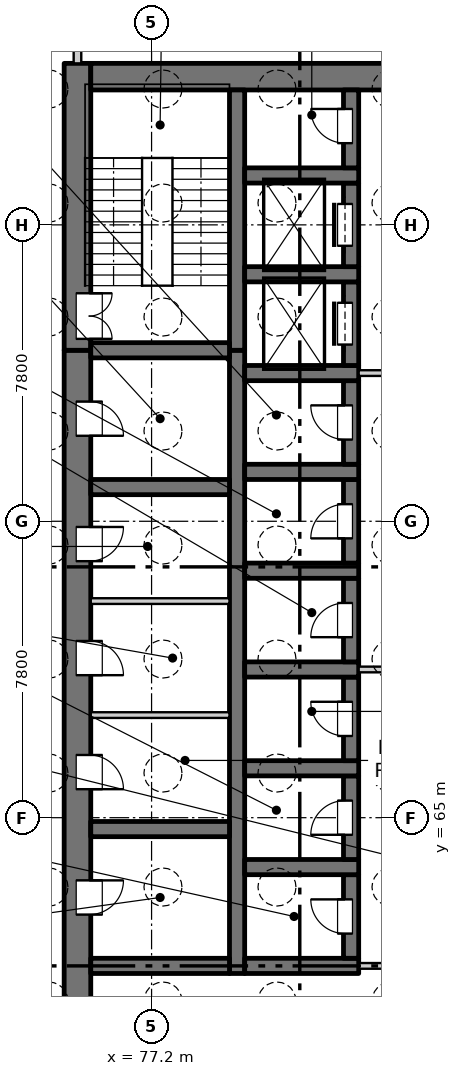
"""IFC4 building model, lengths in metres.
Left out: names, types, materials, properties, quantities, classifications, styles, units other than length and angle.
Written with IfcOpenShell. Run it as: python <this file> out.ifc"""

import sys

from ifc_helpers import new_model, si_unit, direction, frame, frame_2d, origin, place, context, subcontext, project, spatial, rectangle, extrude, element, fill, save


model = new_model("IFC4")
c1 = context("Model", 3, precision=1e-05, world=origin(), true_north=direction((0.0, 1.0)))
c2 = subcontext(c1, "Body", "Model", "MODEL_VIEW")
j1 = project(units=[si_unit("LENGTHUNIT", "METRE"), si_unit("PLANEANGLEUNIT", "RADIAN")], contexts=[c1])
p1 = place(None, origin())
s1 = spatial("IfcSite", under=j1, at=p1, CompositionType="ELEMENT")
p2 = place(p1, origin())
s2 = spatial("IfcBuilding", under=s1, at=p2, CompositionType="ELEMENT")
p3 = place(p2, frame((0.0, 0.0, -9.0)))
s3 = spatial("IfcBuildingStorey", under=s2, at=p3, CompositionType="ELEMENT", Elevation=-9.0)
p4 = place(p3, frame((75.25, 54.9, -0.5), z_axis=(0.0, 0.0, 1.0), x_axis=(0.0, 1.0, 0.0)))
e1 = element("IfcWall", 1, at=p4, inside=s3, PredefinedType="SOLIDWALL", context=c2, shape_type="SweptSolid", body=[
    extrude(rectangle(XDim=22.4, YDim=0.7, at=frame_2d((11.2, 0.0))), origin(), (0.0, 0.0, 1.0), 4.65),
])
p5 = place(p4, frame((7.55, 0.0, 0.5)))
e2 = element("IfcOpeningElement", 2, at=p5, cuts=e1, PredefinedType="OPENING", context=c2, shape_type="SweptSolid", body=[
    extrude(rectangle(XDim=0.9, YDim=2.1, at=frame_2d((0.45, 1.05))), frame((0.0, 0.36, 0.0), z_axis=(0.0, -1.0, 0.0), x_axis=(1.0, 0.0, 0.0)), (0.0, 0.0, 1.0), 0.72),
])
p6 = place(p4, frame((10.85, 0.0, 0.5)))
e3 = element("IfcOpeningElement", 3, at=p6, cuts=e1, PredefinedType="OPENING", context=c2, shape_type="SweptSolid", body=[
    extrude(rectangle(XDim=0.9, YDim=2.1, at=frame_2d((0.45, 1.05))), frame((0.0, 0.36, 0.0), z_axis=(0.0, -1.0, 0.0), x_axis=(1.0, 0.0, 0.0)), (0.0, 0.0, 1.0), 0.72),
])
p7 = place(p4, frame((13.85, 0.0, 0.5)))
e4 = element("IfcOpeningElement", 4, at=p7, cuts=e1, PredefinedType="OPENING", context=c2, shape_type="SweptSolid", body=[
    extrude(rectangle(XDim=0.9, YDim=2.1, at=frame_2d((0.45, 1.05))), frame((0.0, 0.36, 0.0), z_axis=(0.0, -1.0, 0.0), x_axis=(1.0, 0.0, 0.0)), (0.0, 0.0, 1.0), 0.72),
])
p8 = place(p4, frame((16.85, 0.0, 0.5)))
e5 = element("IfcOpeningElement", 5, at=p8, cuts=e1, PredefinedType="OPENING", context=c2, shape_type="SweptSolid", body=[
    extrude(rectangle(XDim=0.9, YDim=2.1, at=frame_2d((0.45, 1.05))), frame((0.0, 0.36, 0.0), z_axis=(0.0, -1.0, 0.0), x_axis=(1.0, 0.0, 0.0)), (0.0, 0.0, 1.0), 0.72),
])
p9 = place(p4, frame((20.15, 0.0, 0.5)))
e6 = element("IfcOpeningElement", 6, at=p9, cuts=e1, PredefinedType="OPENING", context=c2, shape_type="SweptSolid", body=[
    extrude(rectangle(XDim=0.9, YDim=2.1, at=frame_2d((0.45, 1.05))), frame((0.0, 0.36, 0.0), z_axis=(0.0, -1.0, 0.0), x_axis=(1.0, 0.0, 0.0)), (0.0, 0.0, 1.0), 0.72),
])
p10 = place(p3, frame((75.25, 77.3, -0.5), z_axis=(0.0, 0.0, 1.0), x_axis=(0.0, 1.0, 0.0)))
e7 = element("IfcWall", 7, at=p10, inside=s3, PredefinedType="SOLIDWALL", context=c2, shape_type="SweptSolid", body=[
    extrude(rectangle(XDim=7.55, YDim=0.7, at=frame_2d((3.775, 0.0))), origin(), (0.0, 0.0, 1.0), 4.65),
])
p11 = place(p10, frame((0.3, 0.0, 0.5)))
e8 = element("IfcOpeningElement", 8, at=p11, cuts=e7, PredefinedType="OPENING", context=c2, shape_type="SweptSolid", body=[
    extrude(rectangle(XDim=1.2, YDim=2.1, at=frame_2d((0.6, 1.05))), frame((0.0, 0.36, 0.0), z_axis=(0.0, -1.0, 0.0), x_axis=(1.0, 0.0, 0.0)), (0.0, 0.0, 1.0), 0.72),
])
p12 = place(p3, frame((75.6, 84.5, -0.5), z_axis=(0.0, 0.0, 1.0), x_axis=(1.0, 0.0, 0.0)))
e9 = element("IfcWall", 9, at=p12, inside=s3, PredefinedType="SOLIDWALL", context=c2, shape_type="SweptSolid", body=[
    extrude(rectangle(XDim=18.8, YDim=0.7, at=frame_2d((9.4, 0.0))), origin(), (0.0, 0.0, 1.0), 4.65),
])
p13 = place(p3, frame((79.45, 60.9, -0.5), z_axis=(0.0, 0.0, 1.0), x_axis=(0.0, 1.0, 0.0)))
e10 = element("IfcWall", 10, at=p13, inside=s3, PredefinedType="SOLIDWALL", context=c2, shape_type="SweptSolid", body=[
    extrude(rectangle(XDim=16.4, YDim=0.4, at=frame_2d((8.2, 0.0))), origin(), (0.0, 0.0, 1.0), 4.65),
])
p14 = place(p3, frame((79.45, 77.3, -0.5), z_axis=(0.0, 0.0, 1.0), x_axis=(0.0, 1.0, 0.0)))
e11 = element("IfcWall", 11, at=p14, inside=s3, PredefinedType="SOLIDWALL", context=c2, shape_type="SweptSolid", body=[
    extrude(rectangle(XDim=6.85, YDim=0.4, at=frame_2d((3.425, 0.0))), origin(), (0.0, 0.0, 1.0), 4.65),
])
p15 = place(p3, frame((79.65, 61.1, -0.5), z_axis=(0.0, 0.0, 1.0), x_axis=(1.0, 0.0, 0.0)))
e12 = element("IfcWall", 12, at=p15, inside=s3, PredefinedType="SOLIDWALL", context=c2, shape_type="SweptSolid", body=[
    extrude(rectangle(XDim=3.0, YDim=0.4, at=frame_2d((1.5, 0.0))), origin(), (0.0, 0.0, 1.0), 4.65),
])
p16 = place(p3, frame((82.45, 61.3, -0.5), z_axis=(0.0, 0.0, 1.0), x_axis=(0.0, 1.0, 0.0)))
e13 = element("IfcWall", 13, at=p16, inside=s3, PredefinedType="SOLIDWALL", context=c2, shape_type="SweptSolid", body=[
    extrude(rectangle(XDim=2.2, YDim=0.4, at=frame_2d((1.1, 0.0))), origin(), (0.0, 0.0, 1.0), 4.65),
])
p17 = place(p16, frame((0.65, 0.0, 0.5)))
e14 = element("IfcOpeningElement", 14, at=p17, cuts=e13, PredefinedType="OPENING", context=c2, shape_type="SweptSolid", body=[
    extrude(rectangle(XDim=0.9, YDim=2.1, at=frame_2d((0.45, 1.05))), frame((0.0, 0.21, 0.0), z_axis=(0.0, -1.0, 0.0), x_axis=(1.0, 0.0, 0.0)), (0.0, 0.0, 1.0), 0.42),
])
p18 = place(p3, frame((79.65, 63.7, -0.5), z_axis=(0.0, 0.0, 1.0), x_axis=(1.0, 0.0, 0.0)))
e15 = element("IfcWall", 15, at=p18, inside=s3, PredefinedType="SOLIDWALL", context=c2, shape_type="SweptSolid", body=[
    extrude(rectangle(XDim=3.0, YDim=0.4, at=frame_2d((1.5, 0.0))), origin(), (0.0, 0.0, 1.0), 4.65),
])
p19 = place(p3, frame((82.45, 63.9, -0.5), z_axis=(0.0, 0.0, 1.0), x_axis=(0.0, 1.0, 0.0)))
e16 = element("IfcWall", 16, at=p19, inside=s3, PredefinedType="SOLIDWALL", context=c2, shape_type="SweptSolid", body=[
    extrude(rectangle(XDim=2.2, YDim=0.4, at=frame_2d((1.1, 0.0))), origin(), (0.0, 0.0, 1.0), 4.65),
])
p20 = place(p19, frame((0.65, 0.0, 0.5)))
e17 = element("IfcOpeningElement", 17, at=p20, cuts=e16, PredefinedType="OPENING", context=c2, shape_type="SweptSolid", body=[
    extrude(rectangle(XDim=0.9, YDim=2.1, at=frame_2d((0.45, 1.05))), frame((0.0, 0.21, 0.0), z_axis=(0.0, -1.0, 0.0), x_axis=(1.0, 0.0, 0.0)), (0.0, 0.0, 1.0), 0.42),
])
p21 = place(p3, frame((79.65, 66.3, -0.5), z_axis=(0.0, 0.0, 1.0), x_axis=(1.0, 0.0, 0.0)))
e18 = element("IfcWall", 18, at=p21, inside=s3, PredefinedType="SOLIDWALL", context=c2, shape_type="SweptSolid", body=[
    extrude(rectangle(XDim=3.0, YDim=0.4, at=frame_2d((1.5, 0.0))), origin(), (0.0, 0.0, 1.0), 4.65),
])
p22 = place(p3, frame((82.45, 66.5, -0.5), z_axis=(0.0, 0.0, 1.0), x_axis=(0.0, 1.0, 0.0)))
e19 = element("IfcWall", 19, at=p22, inside=s3, PredefinedType="SOLIDWALL", context=c2, shape_type="SweptSolid", body=[
    extrude(rectangle(XDim=2.2, YDim=0.4, at=frame_2d((1.1, 0.0))), origin(), (0.0, 0.0, 1.0), 4.65),
])
p23 = place(p22, frame((0.65, 0.0, 0.5)))
e20 = element("IfcOpeningElement", 20, at=p23, cuts=e19, PredefinedType="OPENING", context=c2, shape_type="SweptSolid", body=[
    extrude(rectangle(XDim=0.9, YDim=2.1, at=frame_2d((0.45, 1.05))), frame((0.0, 0.21, 0.0), z_axis=(0.0, -1.0, 0.0), x_axis=(1.0, 0.0, 0.0)), (0.0, 0.0, 1.0), 0.42),
])
p24 = place(p3, frame((79.65, 68.9, -0.5), z_axis=(0.0, 0.0, 1.0), x_axis=(1.0, 0.0, 0.0)))
e21 = element("IfcWall", 21, at=p24, inside=s3, PredefinedType="SOLIDWALL", context=c2, shape_type="SweptSolid", body=[
    extrude(rectangle(XDim=3.0, YDim=0.4, at=frame_2d((1.5, 0.0))), origin(), (0.0, 0.0, 1.0), 4.65),
])
p25 = place(p3, frame((82.45, 69.1, -0.5), z_axis=(0.0, 0.0, 1.0), x_axis=(0.0, 1.0, 0.0)))
e22 = element("IfcWall", 22, at=p25, inside=s3, PredefinedType="SOLIDWALL", context=c2, shape_type="SweptSolid", body=[
    extrude(rectangle(XDim=2.2, YDim=0.4, at=frame_2d((1.1, 0.0))), origin(), (0.0, 0.0, 1.0), 4.65),
])
p26 = place(p25, frame((0.65, 0.0, 0.5)))
e23 = element("IfcOpeningElement", 23, at=p26, cuts=e22, PredefinedType="OPENING", context=c2, shape_type="SweptSolid", body=[
    extrude(rectangle(XDim=0.9, YDim=2.1, at=frame_2d((0.45, 1.05))), frame((0.0, 0.21, 0.0), z_axis=(0.0, -1.0, 0.0), x_axis=(1.0, 0.0, 0.0)), (0.0, 0.0, 1.0), 0.42),
])
p27 = place(p3, frame((79.65, 71.5, -0.5), z_axis=(0.0, 0.0, 1.0), x_axis=(1.0, 0.0, 0.0)))
e24 = element("IfcWall", 24, at=p27, inside=s3, PredefinedType="SOLIDWALL", context=c2, shape_type="SweptSolid", body=[
    extrude(rectangle(XDim=3.0, YDim=0.4, at=frame_2d((1.5, 0.0))), origin(), (0.0, 0.0, 1.0), 4.65),
])
p28 = place(p3, frame((82.45, 71.7, -0.5), z_axis=(0.0, 0.0, 1.0), x_axis=(0.0, 1.0, 0.0)))
e25 = element("IfcWall", 25, at=p28, inside=s3, PredefinedType="SOLIDWALL", context=c2, shape_type="SweptSolid", body=[
    extrude(rectangle(XDim=2.2, YDim=0.4, at=frame_2d((1.1, 0.0))), origin(), (0.0, 0.0, 1.0), 4.65),
])
p29 = place(p28, frame((0.65, 0.0, 0.5)))
e26 = element("IfcOpeningElement", 26, at=p29, cuts=e25, PredefinedType="OPENING", context=c2, shape_type="SweptSolid", body=[
    extrude(rectangle(XDim=0.9, YDim=2.1, at=frame_2d((0.45, 1.05))), frame((0.0, 0.21, 0.0), z_axis=(0.0, -1.0, 0.0), x_axis=(1.0, 0.0, 0.0)), (0.0, 0.0, 1.0), 0.42),
])
p30 = place(p3, frame((79.65, 74.1, -0.5), z_axis=(0.0, 0.0, 1.0), x_axis=(1.0, 0.0, 0.0)))
e27 = element("IfcWall", 27, at=p30, inside=s3, PredefinedType="SOLIDWALL", context=c2, shape_type="SweptSolid", body=[
    extrude(rectangle(XDim=3.0, YDim=0.4, at=frame_2d((1.5, 0.0))), origin(), (0.0, 0.0, 1.0), 4.65),
])
p31 = place(p3, frame((82.45, 74.3, -0.5), z_axis=(0.0, 0.0, 1.0), x_axis=(0.0, 1.0, 0.0)))
e28 = element("IfcWall", 28, at=p31, inside=s3, PredefinedType="SOLIDWALL", context=c2, shape_type="SweptSolid", body=[
    extrude(rectangle(XDim=2.2, YDim=0.4, at=frame_2d((1.1, 0.0))), origin(), (0.0, 0.0, 1.0), 4.65),
])
p32 = place(p31, frame((0.65, 0.0, 0.5)))
e29 = element("IfcOpeningElement", 29, at=p32, cuts=e28, PredefinedType="OPENING", context=c2, shape_type="SweptSolid", body=[
    extrude(rectangle(XDim=0.9, YDim=2.1, at=frame_2d((0.45, 1.05))), frame((0.0, 0.21, 0.0), z_axis=(0.0, -1.0, 0.0), x_axis=(1.0, 0.0, 0.0)), (0.0, 0.0, 1.0), 0.42),
])
p33 = place(p3, frame((79.65, 76.7, -0.5), z_axis=(0.0, 0.0, 1.0), x_axis=(1.0, 0.0, 0.0)))
e30 = element("IfcWall", 30, at=p33, inside=s3, PredefinedType="SOLIDWALL", context=c2, shape_type="SweptSolid", body=[
    extrude(rectangle(XDim=3.0, YDim=0.4, at=frame_2d((1.5, 0.0))), origin(), (0.0, 0.0, 1.0), 4.65),
])
p34 = place(p3, frame((82.45, 76.9, -0.5), z_axis=(0.0, 0.0, 1.0), x_axis=(0.0, 1.0, 0.0)))
e31 = element("IfcWall", 31, at=p34, inside=s3, PredefinedType="SOLIDWALL", context=c2, shape_type="SweptSolid", body=[
    extrude(rectangle(XDim=2.2, YDim=0.4, at=frame_2d((1.1, 0.0))), origin(), (0.0, 0.0, 1.0), 4.65),
])
p35 = place(p34, frame((0.55, 0.0, 0.5)))
e32 = element("IfcOpeningElement", 32, at=p35, cuts=e31, PredefinedType="OPENING", context=c2, shape_type="SweptSolid", body=[
    extrude(rectangle(XDim=1.1, YDim=2.1, at=frame_2d((0.55, 1.05))), frame((0.0, 0.21, 0.0), z_axis=(0.0, -1.0, 0.0), x_axis=(1.0, 0.0, 0.0)), (0.0, 0.0, 1.0), 0.42),
])
p36 = place(p3, frame((79.65, 79.3, -0.5), z_axis=(0.0, 0.0, 1.0), x_axis=(1.0, 0.0, 0.0)))
e33 = element("IfcWall", 33, at=p36, inside=s3, PredefinedType="SOLIDWALL", context=c2, shape_type="SweptSolid", body=[
    extrude(rectangle(XDim=3.0, YDim=0.4, at=frame_2d((1.5, 0.0))), origin(), (0.0, 0.0, 1.0), 4.65),
])
p37 = place(p3, frame((82.45, 79.5, -0.5), z_axis=(0.0, 0.0, 1.0), x_axis=(0.0, 1.0, 0.0)))
e34 = element("IfcWall", 34, at=p37, inside=s3, PredefinedType="SOLIDWALL", context=c2, shape_type="SweptSolid", body=[
    extrude(rectangle(XDim=2.2, YDim=0.4, at=frame_2d((1.1, 0.0))), origin(), (0.0, 0.0, 1.0), 4.65),
])
p38 = place(p37, frame((0.55, 0.0, 0.5)))
e35 = element("IfcOpeningElement", 35, at=p38, cuts=e34, PredefinedType="OPENING", context=c2, shape_type="SweptSolid", body=[
    extrude(rectangle(XDim=1.1, YDim=2.1, at=frame_2d((0.55, 1.05))), frame((0.0, 0.21, 0.0), z_axis=(0.0, -1.0, 0.0), x_axis=(1.0, 0.0, 0.0)), (0.0, 0.0, 1.0), 0.42),
])
p39 = place(p3, frame((79.65, 81.9, -0.5), z_axis=(0.0, 0.0, 1.0), x_axis=(1.0, 0.0, 0.0)))
e36 = element("IfcWall", 36, at=p39, inside=s3, PredefinedType="SOLIDWALL", context=c2, shape_type="SweptSolid", body=[
    extrude(rectangle(XDim=3.0, YDim=0.4, at=frame_2d((1.5, 0.0))), origin(), (0.0, 0.0, 1.0), 4.65),
])
p40 = place(p3, frame((82.45, 82.1, -0.5), z_axis=(0.0, 0.0, 1.0), x_axis=(0.0, 1.0, 0.0)))
e37 = element("IfcWall", 37, at=p40, inside=s3, PredefinedType="SOLIDWALL", context=c2, shape_type="SweptSolid", body=[
    extrude(rectangle(XDim=2.05, YDim=0.4, at=frame_2d((1.025, 0.0))), origin(), (0.0, 0.0, 1.0), 4.65),
])
p41 = place(p40, frame((0.65, 0.0, 0.5)))
e38 = element("IfcOpeningElement", 38, at=p41, cuts=e37, PredefinedType="OPENING", context=c2, shape_type="SweptSolid", body=[
    extrude(rectangle(XDim=0.9, YDim=2.1, at=frame_2d((0.45, 1.05))), frame((0.0, 0.21, 0.0), z_axis=(0.0, -1.0, 0.0), x_axis=(1.0, 0.0, 0.0)), (0.0, 0.0, 1.0), 0.42),
])
for number, where, z_axis, x_axis in (
    (39, (75.6, 61.1, -0.5), (0.0, 0.0, 1.0), (1.0, 0.0, 0.0)),
    (40, (75.6, 64.7, -0.5), (0.0, 0.0, 1.0), (1.0, 0.0, 0.0)),
    (41, (75.6, 73.7, -0.5), (0.0, 0.0, 1.0), (1.0, 0.0, 0.0)),
    (42, (75.6, 77.3, -0.5), (0.0, 0.0, 1.0), (1.0, 0.0, 0.0)),
):
    element("IfcWall", number, at=place(p3, frame(where, z_axis=z_axis, x_axis=x_axis)), inside=s3, PredefinedType="SOLIDWALL", context=c2, shape_type="SweptSolid", body=[
        extrude(rectangle(XDim=3.65, YDim=0.4, at=frame_2d((1.825, 0.0))), origin(), (0.0, 0.0, 1.0), 4.65),
    ])
p42 = place(p3, frame((82.65, 61.1, 0.0), z_axis=(0.0, 0.0, 1.0), x_axis=(1.0, 0.0, 0.0)))
e43 = element("IfcWall", 43, at=p42, inside=s3, PredefinedType="PARTITIONING", context=c2, shape_type="SweptSolid", body=[
    extrude(rectangle(XDim=4.7, YDim=0.15, at=frame_2d((2.35, 0.0))), origin(), (0.0, 0.0, 1.0), 4.15),
])
p43 = place(p42, frame((1.45, 0.0, 0.0)))
e44 = element("IfcOpeningElement", 44, at=p43, cuts=e43, PredefinedType="OPENING", context=c2, shape_type="SweptSolid", body=[
    extrude(rectangle(XDim=1.8, YDim=2.1, at=frame_2d((0.9, 1.05))), frame((0.0, 0.085, 0.0), z_axis=(0.0, -1.0, 0.0), x_axis=(1.0, 0.0, 0.0)), (0.0, 0.0, 1.0), 0.17),
])
p44 = place(p3, frame((75.6, 67.7, 0.0), z_axis=(0.0, 0.0, 1.0), x_axis=(1.0, 0.0, 0.0)))
e45 = element("IfcWall", 45, at=p44, inside=s3, PredefinedType="PARTITIONING", context=c2, shape_type="SweptSolid", body=[
    extrude(rectangle(XDim=3.65, YDim=0.15, at=frame_2d((1.825, 0.0))), origin(), (0.0, 0.0, 1.0), 4.15),
])
p45 = place(p3, frame((82.65, 68.9, 0.0), z_axis=(0.0, 0.0, 1.0), x_axis=(1.0, 0.0, 0.0)))
e46 = element("IfcWall", 46, at=p45, inside=s3, PredefinedType="PARTITIONING", context=c2, shape_type="SweptSolid", body=[
    extrude(rectangle(XDim=4.7, YDim=0.15, at=frame_2d((2.35, 0.0))), origin(), (0.0, 0.0, 1.0), 4.15),
])
p46 = place(p45, frame((1.45, 0.0, 0.0)))
e47 = element("IfcOpeningElement", 47, at=p46, cuts=e46, PredefinedType="OPENING", context=c2, shape_type="SweptSolid", body=[
    extrude(rectangle(XDim=1.8, YDim=2.1, at=frame_2d((0.9, 1.05))), frame((0.0, 0.085, 0.0), z_axis=(0.0, -1.0, 0.0), x_axis=(1.0, 0.0, 0.0)), (0.0, 0.0, 1.0), 0.17),
])
p47 = place(p3, frame((75.6, 70.7, 0.0), z_axis=(0.0, 0.0, 1.0), x_axis=(1.0, 0.0, 0.0)))
e48 = element("IfcWall", 48, at=p47, inside=s3, PredefinedType="PARTITIONING", context=c2, shape_type="SweptSolid", body=[
    extrude(rectangle(XDim=3.65, YDim=0.15, at=frame_2d((1.825, 0.0))), origin(), (0.0, 0.0, 1.0), 4.15),
])
p48 = place(p3, frame((82.65, 76.7, 0.0), z_axis=(0.0, 0.0, 1.0), x_axis=(1.0, 0.0, 0.0)))
e49 = element("IfcWall", 49, at=p48, inside=s3, PredefinedType="PARTITIONING", context=c2, shape_type="SweptSolid", body=[
    extrude(rectangle(XDim=4.7, YDim=0.15, at=frame_2d((2.35, 0.0))), origin(), (0.0, 0.0, 1.0), 4.15),
])
p49 = place(p48, frame((1.45, 0.0, 0.0)))
e50 = element("IfcOpeningElement", 50, at=p49, cuts=e49, PredefinedType="OPENING", context=c2, shape_type="SweptSolid", body=[
    extrude(rectangle(XDim=1.8, YDim=2.1, at=frame_2d((0.9, 1.05))), frame((0.0, 0.085, 0.0), z_axis=(0.0, -1.0, 0.0), x_axis=(1.0, 0.0, 0.0)), (0.0, 0.0, 1.0), 0.17),
])
p50 = place(p3, frame((75.25, 84.85, 0.0), z_axis=(0.0, 0.0, 1.0), x_axis=(0.0, 1.0, 0.0)))
e51 = element("IfcWall", 51, at=p50, inside=s3, PredefinedType="PARTITIONING", context=c2, shape_type="SweptSolid", body=[
    extrude(rectangle(XDim=7.15, YDim=0.2, at=frame_2d((3.575, 0.0))), origin(), (0.0, 0.0, 1.0), 4.15),
])
p51 = place(p50, frame((1.15, 0.0, 0.0)))
e52 = element("IfcOpeningElement", 52, at=p51, cuts=e51, PredefinedType="OPENING", context=c2, shape_type="SweptSolid", body=[
    extrude(rectangle(XDim=0.9, YDim=2.1, at=frame_2d((0.45, 1.05))), frame((0.0, 0.11, 0.0), z_axis=(0.0, -1.0, 0.0), x_axis=(1.0, 0.0, 0.0)), (0.0, 0.0, 1.0), 0.22),
])
p52 = place(p17, origin())
e53 = element("IfcDoor", 53, at=p52, inside=s3, OperationType="SINGLE_SWING_RIGHT", PredefinedType="DOOR", context=c2, shape_type="SweptSolid", body=[
    extrude(rectangle(XDim=0.9, YDim=2.1, at=frame_2d((0.45, 1.05))), frame((0.0, 0.185, 0.0), z_axis=(0.0, -1.0, 0.0), x_axis=(1.0, 0.0, 0.0)), (0.0, 0.0, 1.0), 0.05),
])
fill(e14, e53)
p53 = place(p5, origin())
e54 = element("IfcDoor", 54, at=p53, inside=s3, OperationType="SINGLE_SWING_LEFT", PredefinedType="DOOR", context=c2, shape_type="SweptSolid", body=[
    extrude(rectangle(XDim=0.9, YDim=2.1, at=frame_2d((0.45, 1.05))), frame((0.0, -0.285, 0.0), z_axis=(0.0, -1.0, 0.0), x_axis=(1.0, 0.0, 0.0)), (0.0, 0.0, 1.0), 0.05),
])
fill(e2, e54)
p54 = place(p20, origin())
e55 = element("IfcDoor", 55, at=p54, inside=s3, OperationType="SINGLE_SWING_LEFT", PredefinedType="DOOR", context=c2, shape_type="SweptSolid", body=[
    extrude(rectangle(XDim=0.9, YDim=2.1, at=frame_2d((0.45, 1.05))), frame((0.0, 0.185, 0.0), z_axis=(0.0, -1.0, 0.0), x_axis=(1.0, 0.0, 0.0)), (0.0, 0.0, 1.0), 0.05),
])
fill(e17, e55)
p55 = place(p6, origin())
e56 = element("IfcDoor", 56, at=p55, inside=s3, OperationType="SINGLE_SWING_RIGHT", PredefinedType="DOOR", context=c2, shape_type="SweptSolid", body=[
    extrude(rectangle(XDim=0.9, YDim=2.1, at=frame_2d((0.45, 1.05))), frame((0.0, -0.285, 0.0), z_axis=(0.0, -1.0, 0.0), x_axis=(1.0, 0.0, 0.0)), (0.0, 0.0, 1.0), 0.05),
])
fill(e3, e56)
p56 = place(p23, origin())
e57 = element("IfcDoor", 57, at=p56, inside=s3, OperationType="SINGLE_SWING_RIGHT", PredefinedType="DOOR", context=c2, shape_type="SweptSolid", body=[
    extrude(rectangle(XDim=0.9, YDim=2.1, at=frame_2d((0.45, 1.05))), frame((0.0, 0.185, 0.0), z_axis=(0.0, -1.0, 0.0), x_axis=(1.0, 0.0, 0.0)), (0.0, 0.0, 1.0), 0.05),
])
fill(e20, e57)
p57 = place(p7, origin())
e58 = element("IfcDoor", 58, at=p57, inside=s3, OperationType="SINGLE_SWING_RIGHT", PredefinedType="DOOR", context=c2, shape_type="SweptSolid", body=[
    extrude(rectangle(XDim=0.9, YDim=2.1, at=frame_2d((0.45, 1.05))), frame((0.0, -0.285, 0.0), z_axis=(0.0, -1.0, 0.0), x_axis=(1.0, 0.0, 0.0)), (0.0, 0.0, 1.0), 0.05),
])
fill(e4, e58)
p58 = place(p26, origin())
e59 = element("IfcDoor", 59, at=p58, inside=s3, OperationType="SINGLE_SWING_LEFT", PredefinedType="DOOR", context=c2, shape_type="SweptSolid", body=[
    extrude(rectangle(XDim=0.9, YDim=2.1, at=frame_2d((0.45, 1.05))), frame((0.0, 0.185, 0.0), z_axis=(0.0, -1.0, 0.0), x_axis=(1.0, 0.0, 0.0)), (0.0, 0.0, 1.0), 0.05),
])
fill(e23, e59)
p59 = place(p8, origin())
e60 = element("IfcDoor", 60, at=p59, inside=s3, OperationType="SINGLE_SWING_LEFT", PredefinedType="DOOR", context=c2, shape_type="SweptSolid", body=[
    extrude(rectangle(XDim=0.9, YDim=2.1, at=frame_2d((0.45, 1.05))), frame((0.0, -0.285, 0.0), z_axis=(0.0, -1.0, 0.0), x_axis=(1.0, 0.0, 0.0)), (0.0, 0.0, 1.0), 0.05),
])
fill(e5, e60)
p60 = place(p29, origin())
e61 = element("IfcDoor", 61, at=p60, inside=s3, OperationType="SINGLE_SWING_LEFT", PredefinedType="DOOR", context=c2, shape_type="SweptSolid", body=[
    extrude(rectangle(XDim=0.9, YDim=2.1, at=frame_2d((0.45, 1.05))), frame((0.0, 0.185, 0.0), z_axis=(0.0, -1.0, 0.0), x_axis=(1.0, 0.0, 0.0)), (0.0, 0.0, 1.0), 0.05),
])
fill(e26, e61)
p61 = place(p32, origin())
e62 = element("IfcDoor", 62, at=p61, inside=s3, OperationType="SINGLE_SWING_RIGHT", PredefinedType="DOOR", context=c2, shape_type="SweptSolid", body=[
    extrude(rectangle(XDim=0.9, YDim=2.1, at=frame_2d((0.45, 1.05))), frame((0.0, 0.185, 0.0), z_axis=(0.0, -1.0, 0.0), x_axis=(1.0, 0.0, 0.0)), (0.0, 0.0, 1.0), 0.05),
])
fill(e29, e62)
p62 = place(p9, origin())
e63 = element("IfcDoor", 63, at=p62, inside=s3, OperationType="SINGLE_SWING_RIGHT", PredefinedType="DOOR", context=c2, shape_type="SweptSolid", body=[
    extrude(rectangle(XDim=0.9, YDim=2.1, at=frame_2d((0.45, 1.05))), frame((0.0, -0.285, 0.0), z_axis=(0.0, -1.0, 0.0), x_axis=(1.0, 0.0, 0.0)), (0.0, 0.0, 1.0), 0.05),
])
fill(e6, e63)
p63 = place(p35, origin())
e64 = element("IfcDoor", 64, at=p63, inside=s3, OperationType="SLIDING_TO_LEFT", PredefinedType="DOOR", context=c2, shape_type="SweptSolid", body=[
    extrude(rectangle(XDim=1.1, YDim=2.1, at=frame_2d((0.55, 1.05))), frame((0.0, 0.185, 0.0), z_axis=(0.0, -1.0, 0.0), x_axis=(1.0, 0.0, 0.0)), (0.0, 0.0, 1.0), 0.05),
])
fill(e32, e64)
p64 = place(p11, origin())
e65 = element("IfcDoor", 65, at=p64, inside=s3, OperationType="DOUBLE_DOOR_SINGLE_SWING", PredefinedType="DOOR", context=c2, shape_type="SweptSolid", body=[
    extrude(rectangle(XDim=1.2, YDim=2.1, at=frame_2d((0.6, 1.05))), frame((0.0, -0.285, 0.0), z_axis=(0.0, -1.0, 0.0), x_axis=(1.0, 0.0, 0.0)), (0.0, 0.0, 1.0), 0.05),
])
fill(e8, e65)
p65 = place(p38, origin())
e66 = element("IfcDoor", 66, at=p65, inside=s3, OperationType="SLIDING_TO_LEFT", PredefinedType="DOOR", context=c2, shape_type="SweptSolid", body=[
    extrude(rectangle(XDim=1.1, YDim=2.1, at=frame_2d((0.55, 1.05))), frame((0.0, 0.185, 0.0), z_axis=(0.0, -1.0, 0.0), x_axis=(1.0, 0.0, 0.0)), (0.0, 0.0, 1.0), 0.05),
])
fill(e35, e66)
p66 = place(p41, origin())
e67 = element("IfcDoor", 67, at=p66, inside=s3, OperationType="SINGLE_SWING_RIGHT", PredefinedType="DOOR", context=c2, shape_type="SweptSolid", body=[
    extrude(rectangle(XDim=0.9, YDim=2.1, at=frame_2d((0.45, 1.05))), frame((0.0, 0.185, 0.0), z_axis=(0.0, -1.0, 0.0), x_axis=(1.0, 0.0, 0.0)), (0.0, 0.0, 1.0), 0.05),
])
fill(e38, e67)
save(model, sys.argv[1])
